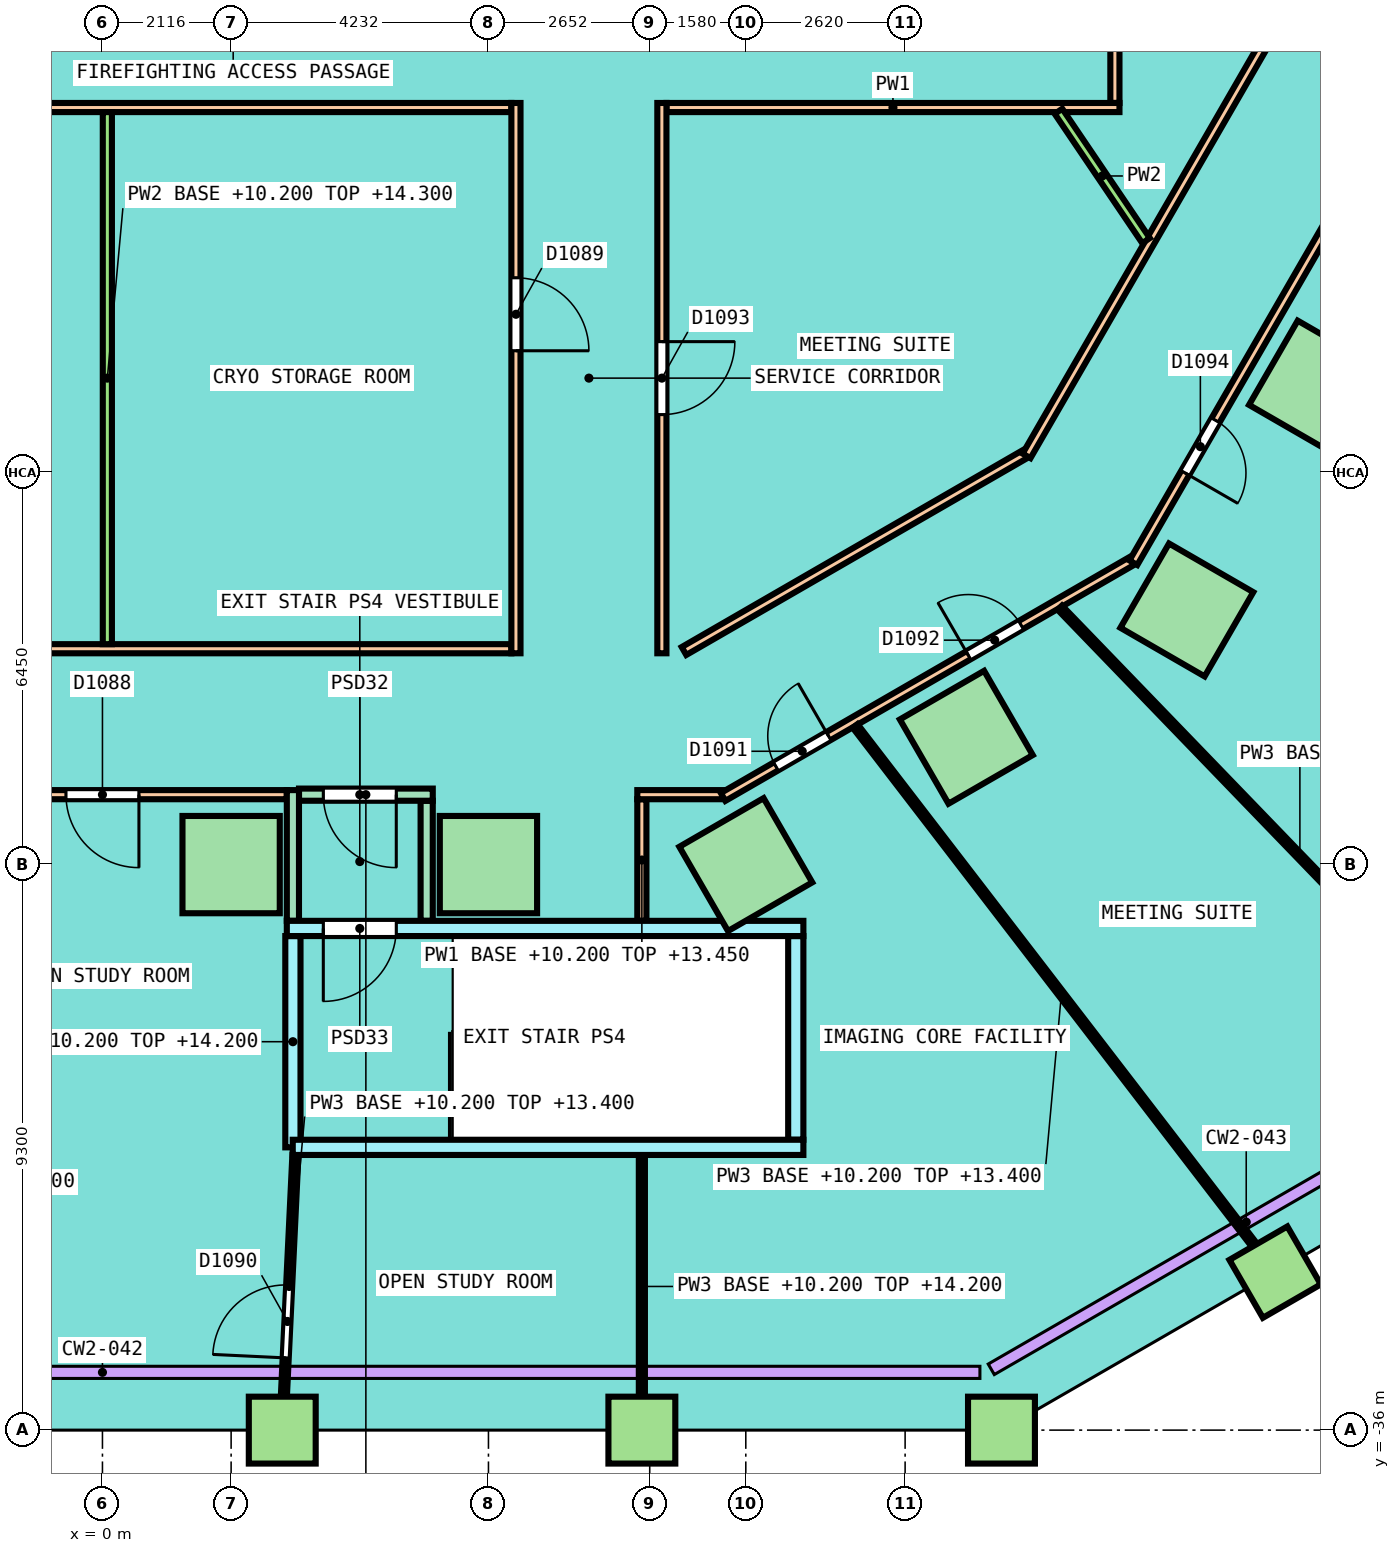
"""IFC4 building model, lengths in metres.
Left out: names, types, materials, properties, quantities, classifications, styles, units other than length and angle.
Written with IfcOpenShell. Run it as: python <this file> out.ifc"""

import sys

from ifc_helpers import new_model, si_unit, direction, frame, frame_2d, origin, origin_2d, place, context, subcontext, project, spatial, rectangle, extrude, element, fill, save


model = new_model("IFC4")
c1 = context("Model", 3, precision=1e-05, world=origin(), true_north=direction((0.0, 1.0)))
c2 = subcontext(c1, "Body", "Model", "MODEL_VIEW")
j1 = project(units=[si_unit("LENGTHUNIT", "METRE"), si_unit("PLANEANGLEUNIT", "RADIAN")], contexts=[c1])
p1 = place(None, origin())
s1 = spatial("IfcSite", under=j1, at=p1, CompositionType="ELEMENT")
p2 = place(p1, origin())
s2 = spatial("IfcBuilding", under=s1, at=p2, CompositionType="ELEMENT")
p3 = place(p2, frame((0.0, 0.0, 10.2)))
s3 = spatial("IfcBuildingStorey", under=s2, at=p3, CompositionType="ELEMENT", Elevation=10.2)
for number, where, z_axis, x_axis in (
    (1, (2.116, -26.7, 0.0), (0.0, 0.0, 1.0), (1.0, 0.0, 0.0)),
    (2, (6.348, -26.7, 0.0), (0.0, 0.0, 1.0), (1.0, 0.0, 0.0)),
    (3, (10.58, -26.7, 0.0), (0.0, 0.0, 1.0), (0.866, 0.5, 0.0)),
    (4, (14.206, -24.606, 0.0), (0.0, 0.0, 1.0), (0.866, 0.5, 0.0)),
    (5, (17.833, -22.512, 0.0), (0.0, 0.0, 1.0), (0.5, 0.866, 0.0)),
    (6, (19.949, -18.847, 0.0), (0.0, 0.0, 1.0), (0.5, 0.866, 0.0)),
):
    element("IfcColumn", number, at=place(p3, frame(where, z_axis=z_axis, x_axis=x_axis)), inside=s3, PredefinedType="COLUMN", context=c2, shape_type="SweptSolid", body=[
        extrude(rectangle(XDim=1.6, YDim=1.6, at=origin_2d()), origin(), (0.0, 0.0, 1.0), 4.05),
    ])
for number, where, z_axis, x_axis in (
    (7, (2.957, -36.0, 0.0), (0.0, 0.0, 1.0), (1.0, 0.0, 0.0)),
    (8, (8.871, -36.0, 0.0), (0.0, 0.0, 1.0), (1.0, 0.0, 0.0)),
    (9, (14.785, -36.0, 0.0), (0.0, 0.0, 1.0), (1.0, 0.0, 0.0)),
    (10, (19.285, -33.402, 0.0), (0.0, 0.0, 1.0), (0.866, 0.5, 0.0)),
):
    element("IfcColumn", number, at=place(p3, frame(where, z_axis=z_axis, x_axis=x_axis)), inside=s3, PredefinedType="COLUMN", context=c2, shape_type="SweptSolid", body=[
        extrude(rectangle(XDim=1.1, YDim=1.1, at=origin_2d()), origin(), (0.0, 0.0, 1.0), 4.05),
    ])
p4 = place(p3, frame((8.871, -27.625, 0.0), z_axis=(0.0, 0.0, 1.0), x_axis=(0.0, 1.0, 0.0)))
e11 = element("IfcWall", 11, at=p4, inside=s3, PredefinedType="PARTITIONING", context=c2, shape_type="SweptSolid", body=[
    extrude(rectangle(XDim=2.0, YDim=0.15, at=frame_2d((1.0, 0.0))), origin(), (0.0, 0.0, 1.0), 3.25),
])
p5 = place(p3, frame((-9.704, -23.15, 0.0), z_axis=(0.0, 0.0, 1.0), x_axis=(1.0, 0.0, 0.0)))
e12 = element("IfcWall", 12, at=p5, inside=s3, PredefinedType="PARTITIONING", context=c2, shape_type="SweptSolid", body=[
    extrude(rectangle(XDim=16.429, YDim=0.15, at=frame_2d((8.214, 0.0))), origin(), (0.0, 0.0, 1.0), 3.05),
])
p6 = place(p5, frame((4.469, 0.0, 0.0)))
e13 = element("IfcOpeningElement", 13, at=p6, cuts=e12, PredefinedType="OPENING", context=c2, shape_type="SweptSolid", body=[
    extrude(rectangle(XDim=1.0, YDim=2.1, at=frame_2d((0.5, 1.05))), frame((0.0, 0.085, 0.0), z_axis=(0.0, -1.0, 0.0), x_axis=(1.0, 0.0, 0.0)), (0.0, 0.0, 1.0), 0.17),
])
p7 = place(p3, frame((-3.032, -25.55, 0.0), z_axis=(0.0, 0.0, 1.0), x_axis=(1.0, 0.0, 0.0)))
e14 = element("IfcWall", 14, at=p7, inside=s3, PredefinedType="PARTITIONING", context=c2, shape_type="SweptSolid", body=[
    extrude(rectangle(XDim=6.064, YDim=0.15, at=frame_2d((3.032, 0.0))), origin(), (0.0, 0.0, 1.0), 3.05),
])
p8 = place(p7, frame((2.432, 0.0, 0.0)))
e15 = element("IfcOpeningElement", 15, at=p8, cuts=e14, PredefinedType="OPENING", context=c2, shape_type="SweptSolid", body=[
    extrude(rectangle(XDim=1.2, YDim=2.1, at=frame_2d((0.6, 1.05))), frame((0.0, 0.085, 0.0), z_axis=(0.0, -1.0, 0.0), x_axis=(1.0, 0.0, 0.0)), (0.0, 0.0, 1.0), 0.17),
])
p9 = place(p3, frame((8.796, -25.55, 0.0), z_axis=(0.0, 0.0, 1.0), x_axis=(1.0, 0.0, 0.0)))
e16 = element("IfcWall", 16, at=p9, inside=s3, PredefinedType="PARTITIONING", context=c2, shape_type="SweptSolid", body=[
    extrude(rectangle(XDim=1.401, YDim=0.15, at=frame_2d((0.7, 0.0))), origin(), (0.0, 0.0, 1.0), 3.05),
])
p10 = place(p3, frame((10.207, -25.587, 0.0), z_axis=(0.0, 0.0, 1.0), x_axis=(0.866023143435, 0.50000391502, 0.0)))
e17 = element("IfcWall", 17, at=p10, inside=s3, PredefinedType="PARTITIONING", context=c2, shape_type="SweptSolid", body=[
    extrude(rectangle(XDim=7.759, YDim=0.15, at=frame_2d((3.879, 0.0))), origin(), (0.0, 0.0, 1.0), 3.05),
])
p11 = place(p10, frame((1.002, 0.0, 0.0)))
e18 = element("IfcOpeningElement", 18, at=p11, cuts=e17, PredefinedType="OPENING", context=c2, shape_type="SweptSolid", body=[
    extrude(rectangle(XDim=1.0, YDim=2.1, at=frame_2d((0.5, 1.05))), frame((0.0, 0.085, 0.0), z_axis=(0.0, -1.0, 0.0), x_axis=(1.0, 0.0, 0.0)), (0.0, 0.0, 1.0), 0.17),
])
p12 = place(p10, frame((4.657, 0.0, 0.0)))
e19 = element("IfcOpeningElement", 19, at=p12, cuts=e17, PredefinedType="OPENING", context=c2, shape_type="SweptSolid", body=[
    extrude(rectangle(XDim=1.0, YDim=2.1, at=frame_2d((0.5, 1.05))), frame((0.0, 0.085, 0.0), z_axis=(0.0, -1.0, 0.0), x_axis=(1.0, 0.0, 0.0)), (0.0, 0.0, 1.0), 0.17),
])
p13 = place(p3, frame((9.564, -23.188, 0.0), z_axis=(0.0, 0.0, 1.0), x_axis=(0.866024786089, 0.500001069878, 0.0)))
e20 = element("IfcWall", 20, at=p13, inside=s3, PredefinedType="PARTITIONING", context=c2, shape_type="SweptSolid", body=[
    extrude(rectangle(XDim=6.473, YDim=0.15, at=frame_2d((3.236, 0.0))), origin(), (0.0, 0.0, 1.0), 3.05),
])
p14 = place(p3, frame((15.197, -19.979, 0.0), z_axis=(0.0, 0.0, 1.0), x_axis=(0.499992422807, 0.866029778435, 0.0)))
e21 = element("IfcWall", 21, at=p14, inside=s3, PredefinedType="PARTITIONING", context=c2, shape_type="SweptSolid", body=[
    extrude(rectangle(XDim=19.257, YDim=0.15, at=frame_2d((9.628, 0.0))), origin(), (0.0, 0.0, 1.0), 3.05),
])
p15 = place(p14, frame((9.061, 0.0, 0.0)))
e22 = element("IfcOpeningElement", 22, at=p15, cuts=e21, PredefinedType="OPENING", context=c2, shape_type="SweptSolid", body=[
    extrude(rectangle(XDim=1.2, YDim=2.1, at=frame_2d((0.6, 1.05))), frame((0.0, 0.085, 0.0), z_axis=(0.0, -1.0, 0.0), x_axis=(1.0, 0.0, 0.0)), (0.0, 0.0, 1.0), 0.17),
])
p16 = place(p3, frame((16.954, -21.736, 0.0), z_axis=(0.0, 0.0, 1.0), x_axis=(0.499996491498, 0.86602742941, 0.0)))
e23 = element("IfcWall", 23, at=p16, inside=s3, PredefinedType="PARTITIONING", context=c2, shape_type="SweptSolid", body=[
    extrude(rectangle(XDim=20.694, YDim=0.15, at=frame_2d((10.347, 0.0))), origin(), (0.0, 0.0, 1.0), 3.05),
])
p17 = place(p16, frame((1.704, 0.0, 0.0)))
e24 = element("IfcOpeningElement", 24, at=p17, cuts=e23, PredefinedType="OPENING", context=c2, shape_type="SweptSolid", body=[
    extrude(rectangle(XDim=1.0, YDim=2.1, at=frame_2d((0.5, 1.05))), frame((0.0, 0.085, 0.0), z_axis=(0.0, -1.0, 0.0), x_axis=(1.0, 0.0, 0.0)), (0.0, 0.0, 1.0), 0.17),
])
p18 = place(p16, frame((9.747, 0.0, 0.0)))
e25 = element("IfcOpeningElement", 25, at=p18, cuts=e23, PredefinedType="OPENING", context=c2, shape_type="SweptSolid", body=[
    extrude(rectangle(XDim=1.2, YDim=2.1, at=frame_2d((0.6, 1.05))), frame((0.0, 0.085, 0.0), z_axis=(0.0, -1.0, 0.0), x_axis=(1.0, 0.0, 0.0)), (0.0, 0.0, 1.0), 0.17),
])
p19 = place(p16, frame((18.331, 0.0, 0.0)))
e26 = element("IfcOpeningElement", 26, at=p19, cuts=e23, PredefinedType="OPENING", context=c2, shape_type="SweptSolid", body=[
    extrude(rectangle(XDim=1.2, YDim=2.1, at=frame_2d((0.6, 1.05))), frame((0.0, 0.085, 0.0), z_axis=(0.0, -1.0, 0.0), x_axis=(1.0, 0.0, 0.0)), (0.0, 0.0, 1.0), 0.17),
])
p20 = place(p3, frame((16.65, -14.175, 0.0), z_axis=(0.0, 0.0, 1.0), x_axis=(0.0, 1.0, 0.0)))
e27 = element("IfcWall", 27, at=p20, inside=s3, PredefinedType="PARTITIONING", context=c2, shape_type="SweptSolid", body=[
    extrude(rectangle(XDim=19.55, YDim=0.15, at=frame_2d((9.775, 0.0))), origin(), (0.0, 0.0, 1.0), 3.05),
])
p21 = place(p3, frame((-16.725, -14.25, 0.0), z_axis=(0.0, 0.0, 1.0), x_axis=(1.0, 0.0, 0.0)))
e28 = element("IfcWall", 28, at=p21, inside=s3, PredefinedType="PARTITIONING", context=c2, shape_type="SweptSolid", body=[
    extrude(rectangle(XDim=23.45, YDim=0.15, at=frame_2d((11.725, 0.0))), origin(), (0.0, 0.0, 1.0), 3.05),
])
p22 = place(p3, frame((9.275, -14.25, 0.0), z_axis=(0.0, 0.0, 1.0), x_axis=(1.0, 0.0, 0.0)))
e29 = element("IfcWall", 29, at=p22, inside=s3, PredefinedType="PARTITIONING", context=c2, shape_type="SweptSolid", body=[
    extrude(rectangle(XDim=7.45, YDim=0.15, at=frame_2d((3.725, 0.0))), origin(), (0.0, 0.0, 1.0), 3.05),
])
p23 = place(p3, frame((6.8, -23.225, 0.0), z_axis=(0.0, 0.0, 1.0), x_axis=(0.0, 1.0, 0.0)))
e30 = element("IfcWall", 30, at=p23, inside=s3, PredefinedType="PARTITIONING", context=c2, shape_type="SweptSolid", body=[
    extrude(rectangle(XDim=9.05, YDim=0.15, at=frame_2d((4.525, 0.0))), origin(), (0.0, 0.0, 1.0), 3.05),
])
p24 = place(p23, frame((4.975, 0.0, 0.0)))
e31 = element("IfcOpeningElement", 31, at=p24, cuts=e30, PredefinedType="OPENING", context=c2, shape_type="SweptSolid", body=[
    extrude(rectangle(XDim=1.2, YDim=2.1, at=frame_2d((0.6, 1.05))), frame((0.0, 0.085, 0.0), z_axis=(0.0, -1.0, 0.0), x_axis=(1.0, 0.0, 0.0)), (0.0, 0.0, 1.0), 0.17),
])
p25 = place(p3, frame((9.2, -23.225, 0.0), z_axis=(0.0, 0.0, 1.0), x_axis=(0.0, 1.0, 0.0)))
e32 = element("IfcWall", 32, at=p25, inside=s3, PredefinedType="PARTITIONING", context=c2, shape_type="SweptSolid", body=[
    extrude(rectangle(XDim=9.05, YDim=0.15, at=frame_2d((4.525, 0.0))), origin(), (0.0, 0.0, 1.0), 3.05),
])
p26 = place(p25, frame((3.925, 0.0, 0.0)))
e33 = element("IfcOpeningElement", 33, at=p26, cuts=e32, PredefinedType="OPENING", context=c2, shape_type="SweptSolid", body=[
    extrude(rectangle(XDim=1.2, YDim=2.1, at=frame_2d((0.6, 1.05))), frame((0.0, 0.085, 0.0), z_axis=(0.0, -1.0, 0.0), x_axis=(1.0, 0.0, 0.0)), (0.0, 0.0, 1.0), 0.17),
])
p27 = place(p3, frame((5.332, -27.625, 0.0), z_axis=(0.0, 0.0, 1.0), x_axis=(0.0, 1.0, 0.0)))
e34 = element("IfcWall", 34, at=p27, inside=s3, PredefinedType="PARTITIONING", context=c2, shape_type="SweptSolid", body=[
    extrude(rectangle(XDim=1.975, YDim=0.2, at=frame_2d((0.988, 0.0))), origin(), (0.0, 0.0, 1.0), 3.25),
])
p28 = place(p3, frame((3.232, -25.55, 0.0), z_axis=(0.0, 0.0, 1.0), x_axis=(1.0, 0.0, 0.0)))
e35 = element("IfcWall", 35, at=p28, inside=s3, PredefinedType="PARTITIONING", context=c2, shape_type="SweptSolid", body=[
    extrude(rectangle(XDim=2.2, YDim=0.2, at=frame_2d((1.1, 0.0))), origin(), (0.0, 0.0, 1.0), 4.05),
])
p29 = place(p28, frame((1.6, 0.0, 0.0), z_axis=(0.0, 0.0, 1.0), x_axis=(-1.0, 0.0, 0.0)))
e36 = element("IfcOpeningElement", 36, at=p29, cuts=e35, PredefinedType="OPENING", context=c2, shape_type="SweptSolid", body=[
    extrude(rectangle(XDim=1.2, YDim=2.1, at=frame_2d((0.6, 1.05))), frame((0.0, 0.11, 0.0), z_axis=(0.0, -1.0, 0.0), x_axis=(1.0, 0.0, 0.0)), (0.0, 0.0, 1.0), 0.22),
])
p30 = place(p3, frame((3.132, -27.625, 0.0), z_axis=(0.0, 0.0, 1.0), x_axis=(0.0, 1.0, 0.0)))
e37 = element("IfcWall", 37, at=p30, inside=s3, PredefinedType="PARTITIONING", context=c2, shape_type="SweptSolid", body=[
    extrude(rectangle(XDim=2.15, YDim=0.2, at=frame_2d((1.075, 0.0))), origin(), (0.0, 0.0, 1.0), 3.25),
])
p31 = place(p3, frame((0.081, -23.075, 0.0), z_axis=(0.0, 0.0, 1.0), x_axis=(0.0, 1.0, 0.0)))
e38 = element("IfcWall", 38, at=p31, inside=s3, PredefinedType="PARTITIONING", context=c2, shape_type="SweptSolid", body=[
    extrude(rectangle(XDim=8.75, YDim=0.15, at=frame_2d((4.375, 0.0))), origin(), (0.0, 0.0, 1.0), 4.1),
])
p32 = place(p3, frame((15.723, -14.312, 0.0), z_axis=(0.0, 0.0, 1.0), x_axis=(0.560499223745, -0.828154949379, 0.0)))
e39 = element("IfcWall", 39, at=p32, inside=s3, PredefinedType="PARTITIONING", context=c2, shape_type="SweptSolid", body=[
    extrude(rectangle(XDim=2.569, YDim=0.15, at=frame_2d((1.284, 0.0))), origin(), (0.0, 0.0, 1.0), 3.05),
])
p33 = place(p3, frame((8.871, -35.8, 0.0), z_axis=(0.0, 0.0, 1.0), x_axis=(0.0, 1.0, 0.0)))
e40 = element("IfcWall", 40, at=p33, inside=s3, PredefinedType="PARTITIONING", context=c2, shape_type="SweptSolid", body=[
    extrude(rectangle(XDim=4.325, YDim=0.1, at=frame_2d((2.163, 0.0))), origin(), (0.0, 0.0, 1.0), 4.0),
])
p34 = place(p3, frame((2.967, -35.8, 0.0), z_axis=(0.0, 0.0, 1.0), x_axis=(0.047755341285, 0.998859062821, 0.0)))
e41 = element("IfcWall", 41, at=p34, inside=s3, PredefinedType="PARTITIONING", context=c2, shape_type="SweptSolid", body=[
    extrude(rectangle(XDim=4.33, YDim=0.1, at=frame_2d((2.165, 0.0))), origin(), (0.0, 0.0, 1.0), 3.2),
])
p35 = place(p34, frame((0.989, 0.0, 0.0)))
e42 = element("IfcOpeningElement", 42, at=p35, cuts=e41, PredefinedType="OPENING", context=c2, shape_type="SweptSolid", body=[
    extrude(rectangle(XDim=1.2, YDim=2.1, at=frame_2d((0.6, 1.05))), frame((0.0, 0.06, 0.0), z_axis=(0.0, -1.0, 0.0), x_axis=(1.0, 0.0, 0.0)), (0.0, 0.0, 1.0), 0.12),
])
p36 = place(p3, frame((12.378, -24.42, 0.0), z_axis=(0.0, 0.0, 1.0), x_axis=(0.609546416877, -0.79275038043, 0.0)))
e43 = element("IfcWall", 43, at=p36, inside=s3, PredefinedType="PARTITIONING", context=c2, shape_type="SweptSolid", body=[
    extrude(rectangle(XDim=11.129, YDim=0.1, at=frame_2d((5.564, 0.0))), origin(), (0.0, 0.0, 1.0), 3.2),
])
p37 = place(p3, frame((15.744, -22.475, 0.0), z_axis=(0.0, 0.0, 1.0), x_axis=(0.694530893364, -0.719462881713, 0.0)))
e44 = element("IfcWall", 44, at=p37, inside=s3, PredefinedType="PARTITIONING", context=c2, shape_type="SweptSolid", body=[
    extrude(rectangle(XDim=11.369, YDim=0.1, at=frame_2d((5.685, 0.0))), origin(), (0.0, 0.0, 1.0), 3.25),
])
p38 = place(p3, frame((3.132, -31.35, 0.0), z_axis=(0.0, 0.0, 1.0), x_axis=(0.0, 1.0, 0.0)))
e45 = element("IfcWall", 45, at=p38, inside=s3, PredefinedType="SOLIDWALL", context=c2, shape_type="SweptSolid", body=[
    extrude(rectangle(XDim=3.475, YDim=0.25, at=frame_2d((1.738, 0.0))), origin(), (0.0, 0.0, 1.0), 4.0),
])
p39 = place(p3, frame((11.402, -31.225, 0.0), z_axis=(0.0, 0.0, 1.0), x_axis=(0.0, 1.0, 0.0)))
e46 = element("IfcWall", 46, at=p39, inside=s3, PredefinedType="SOLIDWALL", context=c2, shape_type="SweptSolid", body=[
    extrude(rectangle(XDim=3.35, YDim=0.25, at=frame_2d((1.675, 0.0))), origin(), (0.0, 0.0, 1.0), 3.2),
])
p40 = place(p3, frame((3.032, -27.75, 0.0), z_axis=(0.0, 0.0, 1.0), x_axis=(1.0, 0.0, 0.0)))
e47 = element("IfcWall", 47, at=p40, inside=s3, PredefinedType="SOLIDWALL", context=c2, shape_type="SweptSolid", body=[
    extrude(rectangle(XDim=8.495, YDim=0.25, at=frame_2d((4.248, 0.0))), origin(), (0.0, 0.0, 1.0), 3.2),
])
p41 = place(p40, frame((1.8, 0.0, 0.0), z_axis=(0.0, 0.0, 1.0), x_axis=(-1.0, 0.0, 0.0)))
e48 = element("IfcOpeningElement", 48, at=p41, cuts=e47, PredefinedType="OPENING", context=c2, shape_type="SweptSolid", body=[
    extrude(rectangle(XDim=1.2, YDim=2.1, at=frame_2d((0.6, 1.05))), frame((0.0, 0.135, 0.0), z_axis=(0.0, -1.0, 0.0), x_axis=(1.0, 0.0, 0.0)), (0.0, 0.0, 1.0), 0.27),
])
p42 = place(p3, frame((3.129, -31.35, 0.0), z_axis=(0.0, 0.0, 1.0), x_axis=(1.0, 0.0, 0.0)))
e49 = element("IfcWall", 49, at=p42, inside=s3, PredefinedType="SOLIDWALL", context=c2, shape_type="SweptSolid", body=[
    extrude(rectangle(XDim=8.397, YDim=0.25, at=frame_2d((4.199, 0.0))), origin(), (0.0, 0.0, 1.0), 3.2),
])
p43 = place(p8, origin())
e50 = element("IfcDoor", 50, at=p43, inside=s3, OperationType="DOUBLE_DOOR_SINGLE_SWING", PredefinedType="DOOR", context=c2, shape_type="SweptSolid", body=[
    extrude(rectangle(XDim=1.2, YDim=2.1, at=frame_2d((0.6, 1.05))), frame((0.0, 0.025, 0.0), z_axis=(0.0, -1.0, 0.0), x_axis=(1.0, 0.0, 0.0)), (0.0, 0.0, 1.0), 0.05),
])
fill(e15, e50)
p44 = place(p24, origin())
e51 = element("IfcDoor", 51, at=p44, inside=s3, OperationType="DOUBLE_DOOR_SINGLE_SWING", PredefinedType="DOOR", context=c2, shape_type="SweptSolid", body=[
    extrude(rectangle(XDim=1.2, YDim=2.1, at=frame_2d((0.6, 1.05))), frame((0.0, 0.025, 0.0), z_axis=(0.0, -1.0, 0.0), x_axis=(1.0, 0.0, 0.0)), (0.0, 0.0, 1.0), 0.05),
])
fill(e31, e51)
p45 = place(p35, origin())
e52 = element("IfcDoor", 52, at=p45, inside=s3, OperationType="DOUBLE_DOOR_SINGLE_SWING", PredefinedType="DOOR", context=c2, shape_type="SweptSolid", body=[
    extrude(rectangle(XDim=1.2, YDim=2.1, at=frame_2d((0.6, 1.05))), frame((0.0, 0.025, 0.0), z_axis=(0.0, -1.0, 0.0), x_axis=(1.0, 0.0, 0.0)), (0.0, 0.0, 1.0), 0.05),
])
fill(e42, e52)
p46 = place(p11, origin())
e53 = element("IfcDoor", 53, at=p46, inside=s3, OperationType="SINGLE_SWING_LEFT", PredefinedType="DOOR", context=c2, shape_type="SweptSolid", body=[
    extrude(rectangle(XDim=1.0, YDim=2.1, at=frame_2d((0.5, 1.05))), frame((0.0, 0.025, 0.0), z_axis=(0.0, -1.0, 0.0), x_axis=(1.0, 0.0, 0.0)), (0.0, 0.0, 1.0), 0.05),
])
fill(e18, e53)
p47 = place(p12, origin())
e54 = element("IfcDoor", 54, at=p47, inside=s3, OperationType="SINGLE_SWING_LEFT", PredefinedType="DOOR", context=c2, shape_type="SweptSolid", body=[
    extrude(rectangle(XDim=1.0, YDim=2.1, at=frame_2d((0.5, 1.05))), frame((0.0, 0.025, 0.0), z_axis=(0.0, -1.0, 0.0), x_axis=(1.0, 0.0, 0.0)), (0.0, 0.0, 1.0), 0.05),
])
fill(e19, e54)
p48 = place(p26, origin())
e55 = element("IfcDoor", 55, at=p48, inside=s3, OperationType="DOUBLE_DOOR_SINGLE_SWING", PredefinedType="DOOR", context=c2, shape_type="SweptSolid", body=[
    extrude(rectangle(XDim=1.2, YDim=2.1, at=frame_2d((0.6, 1.05))), frame((0.0, 0.025, 0.0), z_axis=(0.0, -1.0, 0.0), x_axis=(1.0, 0.0, 0.0)), (0.0, 0.0, 1.0), 0.05),
])
fill(e33, e55)
p49 = place(p17, origin())
e56 = element("IfcDoor", 56, at=p49, inside=s3, OperationType="SINGLE_SWING_RIGHT", PredefinedType="DOOR", context=c2, shape_type="SweptSolid", body=[
    extrude(rectangle(XDim=1.0, YDim=2.1, at=frame_2d((0.5, 1.05))), frame((0.0, 0.025, 0.0), z_axis=(0.0, -1.0, 0.0), x_axis=(1.0, 0.0, 0.0)), (0.0, 0.0, 1.0), 0.05),
])
fill(e24, e56)
p50 = place(p29, origin())
e57 = element("IfcDoor", 57, at=p50, inside=s3, OperationType="SINGLE_SWING_LEFT", PredefinedType="DOOR", context=c2, shape_type="SweptSolid", body=[
    extrude(rectangle(XDim=1.2, YDim=2.1, at=frame_2d((0.6, 1.05))), frame((0.0, 0.025, 0.0), z_axis=(0.0, -1.0, 0.0), x_axis=(1.0, 0.0, 0.0)), (0.0, 0.0, 1.0), 0.05),
])
fill(e36, e57)
p51 = place(p41, origin())
e58 = element("IfcDoor", 58, at=p51, inside=s3, OperationType="SINGLE_SWING_RIGHT", PredefinedType="DOOR", context=c2, shape_type="SweptSolid", body=[
    extrude(rectangle(XDim=1.2, YDim=2.1, at=frame_2d((0.6, 1.05))), frame((0.0, 0.025, 0.0), z_axis=(0.0, -1.0, 0.0), x_axis=(1.0, 0.0, 0.0)), (0.0, 0.0, 1.0), 0.05),
])
fill(e48, e58)
save(model, sys.argv[1])
